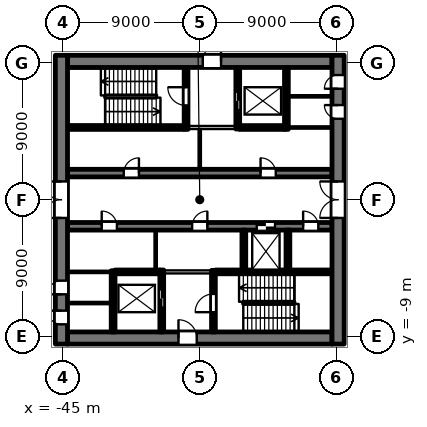
"""IFC4 building model, lengths in metres.
Left out: names, types, materials, properties, quantities, classifications, styles, units other than length and angle.
Written with IfcOpenShell. Run it as: python <this file> out.ifc"""

import sys

from ifc_helpers import new_model, si_unit, direction, frame, frame_2d, origin, place, context, subcontext, project, spatial, rectangle, extrude, element, fill, save


model = new_model("IFC4")
c1 = context("Model", 3, precision=1e-05, world=origin(), true_north=direction((0.0, 1.0)))
c2 = subcontext(c1, "Body", "Model", "MODEL_VIEW")
j1 = project(units=[si_unit("LENGTHUNIT", "METRE"), si_unit("PLANEANGLEUNIT", "RADIAN")], contexts=[c1])
p1 = place(None, origin())
s1 = spatial("IfcSite", under=j1, at=p1, CompositionType="ELEMENT")
p2 = place(p1, origin())
s2 = spatial("IfcBuilding", under=s1, at=p2, CompositionType="ELEMENT")
p3 = place(p2, frame((0.0, 0.0, -9.0)))
s3 = spatial("IfcBuildingStorey", under=s2, at=p3, CompositionType="ELEMENT", Elevation=-9.0)
p4 = place(p3, frame((-44.7, -9.1, 0.0), z_axis=(0.0, 0.0, 1.0), x_axis=(1.0, 0.0, 0.0)))
e1 = element("IfcWall", 1, at=p4, inside=s3, PredefinedType="SHEAR", context=c2, shape_type="SweptSolid", body=[
    extrude(rectangle(XDim=17.4, YDim=0.8, at=frame_2d((8.7, 0.0))), origin(), (0.0, 0.0, 1.0), 4.1),
])
p5 = place(p4, frame((7.3, 0.0, 0.0)))
e2 = element("IfcOpeningElement", 2, at=p5, cuts=e1, PredefinedType="OPENING", context=c2, shape_type="SweptSolid", body=[
    extrude(rectangle(XDim=1.2, YDim=2.1, at=frame_2d((0.6, 1.05))), frame((0.0, 0.41, 0.0), z_axis=(0.0, -1.0, 0.0), x_axis=(1.0, 0.0, 0.0)), (0.0, 0.0, 1.0), 0.82),
])
for number, where, z_axis, x_axis in (
    (3, (-44.7, -6.8, 0.0), (0.0, 0.0, 1.0), (1.0, 0.0, 0.0)),
    (4, (-44.7, -4.75, 0.0), (0.0, 0.0, 1.0), (1.0, 0.0, 0.0)),
):
    element("IfcWall", number, at=place(p3, frame(where, z_axis=z_axis, x_axis=x_axis)), inside=s3, PredefinedType="PARTITIONING", context=c2, shape_type="SweptSolid", body=[
        extrude(rectangle(XDim=2.875, YDim=0.15, at=frame_2d((1.438, 0.0))), origin(), (0.0, 0.0, 1.0), 4.1),
    ])
p6 = place(p3, frame((-41.575, -4.75, 0.0), z_axis=(0.0, 0.0, 1.0), x_axis=(1.0, 0.0, 0.0)))
e5 = element("IfcWall", 5, at=p6, inside=s3, PredefinedType="SHEAR", context=c2, shape_type="SweptSolid", body=[
    extrude(rectangle(XDim=2.95, YDim=0.25, at=frame_2d((1.475, 0.0))), origin(), (0.0, 0.0, 1.0), 4.1),
])
p7 = place(p3, frame((-38.375, -4.75, 0.0), z_axis=(0.0, 0.0, 1.0), x_axis=(1.0, 0.0, 0.0)))
e6 = element("IfcWall", 6, at=p7, inside=s3, PredefinedType="PARTITIONING", context=c2, shape_type="SweptSolid", body=[
    extrude(rectangle(XDim=3.15, YDim=0.2, at=frame_2d((1.575, 0.0))), origin(), (0.0, 0.0, 1.0), 4.1),
])
p8 = place(p3, frame((-34.975, -4.75, 0.0), z_axis=(0.0, 0.0, 1.0), x_axis=(1.0, 0.0, 0.0)))
e7 = element("IfcWall", 7, at=p8, inside=s3, PredefinedType="SHEAR", context=c2, shape_type="SweptSolid", body=[
    extrude(rectangle(XDim=7.675, YDim=0.25, at=frame_2d((3.837, 0.0))), origin(), (0.0, 0.0, 1.0), 4.1),
])
p9 = place(p3, frame((-44.7, -1.75, 0.0), z_axis=(0.0, 0.0, 1.0), x_axis=(1.0, 0.0, 0.0)))
e8 = element("IfcWall", 8, at=p9, inside=s3, PredefinedType="SHEAR", context=c2, shape_type="SweptSolid", body=[
    extrude(rectangle(XDim=17.4, YDim=0.5, at=frame_2d((8.7, 0.0))), origin(), (0.0, 0.0, 1.0), 4.1),
])
p10 = place(p9, frame((12.45, 0.0, 0.0)))
e9 = element("IfcOpeningElement", 9, at=p10, cuts=e8, PredefinedType="OPENING", context=c2, shape_type="SweptSolid", body=[
    extrude(rectangle(XDim=1.2, YDim=2.1, at=frame_2d((0.6, 1.05))), frame((0.0, 0.26, 0.0), z_axis=(0.0, -1.0, 0.0), x_axis=(1.0, 0.0, 0.0)), (0.0, 0.0, 1.0), 0.52),
])
p11 = place(p9, frame((2.25, 0.0, 0.0)))
e10 = element("IfcOpeningElement", 10, at=p11, cuts=e8, PredefinedType="OPENING", context=c2, shape_type="SweptSolid", body=[
    extrude(rectangle(XDim=1.0, YDim=2.1, at=frame_2d((0.5, 1.05))), frame((0.0, 0.26, 0.0), z_axis=(0.0, -1.0, 0.0), x_axis=(1.0, 0.0, 0.0)), (0.0, 0.0, 1.0), 0.52),
])
p12 = place(p9, frame((8.2, 0.0, 0.0)))
e11 = element("IfcOpeningElement", 11, at=p12, cuts=e8, PredefinedType="OPENING", context=c2, shape_type="SweptSolid", body=[
    extrude(rectangle(XDim=1.0, YDim=2.1, at=frame_2d((0.5, 1.05))), frame((0.0, 0.26, 0.0), z_axis=(0.0, -1.0, 0.0), x_axis=(1.0, 0.0, 0.0)), (0.0, 0.0, 1.0), 0.52),
])
p13 = place(p9, frame((15.5, 0.0, 0.0)))
e12 = element("IfcOpeningElement", 12, at=p13, cuts=e8, PredefinedType="OPENING", context=c2, shape_type="SweptSolid", body=[
    extrude(rectangle(XDim=1.0, YDim=2.1, at=frame_2d((0.5, 1.05))), frame((0.0, 0.26, 0.0), z_axis=(0.0, -1.0, 0.0), x_axis=(1.0, 0.0, 0.0)), (0.0, 0.0, 1.0), 0.52),
])
p14 = place(p3, frame((-44.7, 1.75, 0.0), z_axis=(0.0, 0.0, 1.0), x_axis=(1.0, 0.0, 0.0)))
e13 = element("IfcWall", 13, at=p14, inside=s3, PredefinedType="SHEAR", context=c2, shape_type="SweptSolid", body=[
    extrude(rectangle(XDim=17.4, YDim=0.5, at=frame_2d((8.7, 0.0))), origin(), (0.0, 0.0, 1.0), 4.1),
])
p15 = place(p14, frame((3.7, 0.0, 0.0)))
e14 = element("IfcOpeningElement", 14, at=p15, cuts=e13, PredefinedType="OPENING", context=c2, shape_type="SweptSolid", body=[
    extrude(rectangle(XDim=1.0, YDim=2.1, at=frame_2d((0.5, 1.05))), frame((0.0, 0.26, 0.0), z_axis=(0.0, -1.0, 0.0), x_axis=(1.0, 0.0, 0.0)), (0.0, 0.0, 1.0), 0.52),
])
p16 = place(p14, frame((12.7, 0.0, 0.0)))
e15 = element("IfcOpeningElement", 15, at=p16, cuts=e13, PredefinedType="OPENING", context=c2, shape_type="SweptSolid", body=[
    extrude(rectangle(XDim=1.0, YDim=2.1, at=frame_2d((0.5, 1.05))), frame((0.0, 0.26, 0.0), z_axis=(0.0, -1.0, 0.0), x_axis=(1.0, 0.0, 0.0)), (0.0, 0.0, 1.0), 0.52),
])
p17 = place(p3, frame((-44.7, 4.75, 0.0), z_axis=(0.0, 0.0, 1.0), x_axis=(1.0, 0.0, 0.0)))
e16 = element("IfcWall", 16, at=p17, inside=s3, PredefinedType="SHEAR", context=c2, shape_type="SweptSolid", body=[
    extrude(rectangle(XDim=7.675, YDim=0.25, at=frame_2d((3.837, 0.0))), origin(), (0.0, 0.0, 1.0), 4.1),
])
p18 = place(p3, frame((-36.775, 4.75, 0.0), z_axis=(0.0, 0.0, 1.0), x_axis=(1.0, 0.0, 0.0)))
e17 = element("IfcWall", 17, at=p18, inside=s3, PredefinedType="PARTITIONING", context=c2, shape_type="SweptSolid", body=[
    extrude(rectangle(XDim=3.15, YDim=0.2, at=frame_2d((1.575, 0.0))), origin(), (0.0, 0.0, 1.0), 4.1),
])
p19 = place(p3, frame((-33.375, 4.75, 0.0), z_axis=(0.0, 0.0, 1.0), x_axis=(1.0, 0.0, 0.0)))
e18 = element("IfcWall", 18, at=p19, inside=s3, PredefinedType="SHEAR", context=c2, shape_type="SweptSolid", body=[
    extrude(rectangle(XDim=2.95, YDim=0.25, at=frame_2d((1.475, 0.0))), origin(), (0.0, 0.0, 1.0), 4.1),
])
for number, where, z_axis, x_axis in (
    (19, (-30.175, 4.75, 0.0), (0.0, 0.0, 1.0), (1.0, 0.0, 0.0)),
    (20, (-30.175, 6.8, 0.0), (0.0, 0.0, 1.0), (1.0, 0.0, 0.0)),
):
    element("IfcWall", number, at=place(p3, frame(where, z_axis=z_axis, x_axis=x_axis)), inside=s3, PredefinedType="PARTITIONING", context=c2, shape_type="SweptSolid", body=[
        extrude(rectangle(XDim=2.875, YDim=0.15, at=frame_2d((1.438, 0.0))), origin(), (0.0, 0.0, 1.0), 4.1),
    ])
p20 = place(p3, frame((-44.7, 9.1, 0.0), z_axis=(0.0, 0.0, 1.0), x_axis=(1.0, 0.0, 0.0)))
e21 = element("IfcWall", 21, at=p20, inside=s3, PredefinedType="SHEAR", context=c2, shape_type="SweptSolid", body=[
    extrude(rectangle(XDim=17.4, YDim=0.8, at=frame_2d((8.7, 0.0))), origin(), (0.0, 0.0, 1.0), 4.1),
])
p21 = place(p20, frame((8.9, 0.0, 0.0)))
e22 = element("IfcOpeningElement", 22, at=p21, cuts=e21, PredefinedType="OPENING", context=c2, shape_type="SweptSolid", body=[
    extrude(rectangle(XDim=1.2, YDim=2.1, at=frame_2d((0.6, 1.05))), frame((0.0, 0.41, 0.0), z_axis=(0.0, -1.0, 0.0), x_axis=(1.0, 0.0, 0.0)), (0.0, 0.0, 1.0), 0.82),
])
p22 = place(p3, frame((-45.1, -9.5, 0.0), z_axis=(0.0, 0.0, 1.0), x_axis=(0.0, 1.0, 0.0)))
e23 = element("IfcWall", 23, at=p22, inside=s3, PredefinedType="SHEAR", context=c2, shape_type="SweptSolid", body=[
    extrude(rectangle(XDim=19.0, YDim=0.8, at=frame_2d((9.5, 0.0))), origin(), (0.0, 0.0, 1.0), 4.1),
])
p23 = place(p22, frame((8.3, 0.0, 0.0)))
e24 = element("IfcOpeningElement", 24, at=p23, cuts=e23, PredefinedType="OPENING", context=c2, shape_type="SweptSolid", body=[
    extrude(rectangle(XDim=2.4, YDim=2.1, at=frame_2d((1.2, 1.05))), frame((0.0, 0.41, 0.0), z_axis=(0.0, -1.0, 0.0), x_axis=(1.0, 0.0, 0.0)), (0.0, 0.0, 1.0), 0.82),
])
p24 = place(p22, frame((1.3, 0.0, 0.0)))
e25 = element("IfcOpeningElement", 25, at=p24, cuts=e23, PredefinedType="OPENING", context=c2, shape_type="SweptSolid", body=[
    extrude(rectangle(XDim=0.9, YDim=2.1, at=frame_2d((0.45, 1.05))), frame((0.0, 0.41, 0.0), z_axis=(0.0, -1.0, 0.0), x_axis=(1.0, 0.0, 0.0)), (0.0, 0.0, 1.0), 0.82),
])
p25 = place(p22, frame((3.275, 0.0, 0.0)))
e26 = element("IfcOpeningElement", 26, at=p25, cuts=e23, PredefinedType="OPENING", context=c2, shape_type="SweptSolid", body=[
    extrude(rectangle(XDim=0.9, YDim=2.1, at=frame_2d((0.45, 1.05))), frame((0.0, 0.41, 0.0), z_axis=(0.0, -1.0, 0.0), x_axis=(1.0, 0.0, 0.0)), (0.0, 0.0, 1.0), 0.82),
])
p26 = place(p3, frame((-41.7, -8.7, 0.0), z_axis=(0.0, 0.0, 1.0), x_axis=(0.0, 1.0, 0.0)))
e27 = element("IfcWall", 27, at=p26, inside=s3, PredefinedType="SHEAR", context=c2, shape_type="SweptSolid", body=[
    extrude(rectangle(XDim=4.025, YDim=0.25, at=frame_2d((2.012, 0.0))), origin(), (0.0, 0.0, 1.0), 4.1),
])
p27 = place(p3, frame((-38.9, -4.625, 0.0), z_axis=(0.0, 0.0, 1.0), x_axis=(0.0, 1.0, 0.0)))
e28 = element("IfcWall", 28, at=p27, inside=s3, PredefinedType="PARTITIONING", context=c2, shape_type="SweptSolid", body=[
    extrude(rectangle(XDim=2.625, YDim=0.15, at=frame_2d((1.312, 0.0))), origin(), (0.0, 0.0, 1.0), 4.1),
])
p28 = place(p3, frame((-38.5, -8.7, 0.0), z_axis=(0.0, 0.0, 1.0), x_axis=(0.0, 1.0, 0.0)))
e29 = element("IfcWall", 29, at=p28, inside=s3, PredefinedType="SHEAR", context=c2, shape_type="SweptSolid", body=[
    extrude(rectangle(XDim=4.075, YDim=0.25, at=frame_2d((2.038, 0.0))), origin(), (0.0, 0.0, 1.0), 4.1),
])
p29 = place(p28, frame((1.6, 0.0, 0.0)))
e30 = element("IfcOpeningElement", 30, at=p29, cuts=e29, PredefinedType="OPENING", context=c2, shape_type="SweptSolid", body=[
    extrude(rectangle(XDim=1.2, YDim=2.1, at=frame_2d((0.6, 1.05))), frame((0.0, 0.135, 0.0), z_axis=(0.0, -1.0, 0.0), x_axis=(1.0, 0.0, 0.0)), (0.0, 0.0, 1.0), 0.27),
])
p30 = place(p3, frame((-36.9, 4.625, 0.0), z_axis=(0.0, 0.0, 1.0), x_axis=(0.0, 1.0, 0.0)))
e31 = element("IfcWall", 31, at=p30, inside=s3, PredefinedType="SHEAR", context=c2, shape_type="SweptSolid", body=[
    extrude(rectangle(XDim=4.075, YDim=0.25, at=frame_2d((2.038, 0.0))), origin(), (0.0, 0.0, 1.0), 4.1),
])
p31 = place(p30, frame((1.575, 0.0, 0.0)))
e32 = element("IfcOpeningElement", 32, at=p31, cuts=e31, PredefinedType="OPENING", context=c2, shape_type="SweptSolid", body=[
    extrude(rectangle(XDim=1.2, YDim=2.1, at=frame_2d((0.6, 1.05))), frame((0.0, 0.135, 0.0), z_axis=(0.0, -1.0, 0.0), x_axis=(1.0, 0.0, 0.0)), (0.0, 0.0, 1.0), 0.27),
])
p32 = place(p3, frame((-36.0, 2.0, 0.0), z_axis=(0.0, 0.0, 1.0), x_axis=(0.0, 1.0, 0.0)))
e33 = element("IfcWall", 33, at=p32, inside=s3, PredefinedType="PARTITIONING", context=c2, shape_type="SweptSolid", body=[
    extrude(rectangle(XDim=2.65, YDim=0.15, at=frame_2d((1.325, 0.0))), origin(), (0.0, 0.0, 1.0), 4.1),
])
p33 = place(p3, frame((-35.1, -8.7, 0.0), z_axis=(0.0, 0.0, 1.0), x_axis=(0.0, 1.0, 0.0)))
e34 = element("IfcWall", 34, at=p33, inside=s3, PredefinedType="SHEAR", context=c2, shape_type="SweptSolid", body=[
    extrude(rectangle(XDim=4.05, YDim=0.25, at=frame_2d((2.025, 0.0))), origin(), (0.0, 0.0, 1.0), 4.1),
])
p34 = place(p33, frame((1.3, 0.0, 0.0)))
e35 = element("IfcOpeningElement", 35, at=p34, cuts=e34, PredefinedType="OPENING", context=c2, shape_type="SweptSolid", body=[
    extrude(rectangle(XDim=1.2, YDim=2.1, at=frame_2d((0.6, 1.05))), frame((0.0, 0.135, 0.0), z_axis=(0.0, -1.0, 0.0), x_axis=(1.0, 0.0, 0.0)), (0.0, 0.0, 1.0), 0.27),
])
p35 = place(p3, frame((-33.5, 4.65, 0.0), z_axis=(0.0, 0.0, 1.0), x_axis=(0.0, 1.0, 0.0)))
e36 = element("IfcWall", 36, at=p35, inside=s3, PredefinedType="SHEAR", context=c2, shape_type="SweptSolid", body=[
    extrude(rectangle(XDim=4.05, YDim=0.25, at=frame_2d((2.025, 0.0))), origin(), (0.0, 0.0, 1.0), 4.1),
])
p36 = place(p35, frame((1.25, 0.0, 0.0)))
e37 = element("IfcOpeningElement", 37, at=p36, cuts=e36, PredefinedType="OPENING", context=c2, shape_type="SweptSolid", body=[
    extrude(rectangle(XDim=1.2, YDim=2.1, at=frame_2d((0.6, 1.05))), frame((0.0, 0.135, 0.0), z_axis=(0.0, -1.0, 0.0), x_axis=(1.0, 0.0, 0.0)), (0.0, 0.0, 1.0), 0.27),
])
p37 = place(p3, frame((-33.1, -4.625, 0.0), z_axis=(0.0, 0.0, 1.0), x_axis=(0.0, 1.0, 0.0)))
e38 = element("IfcWall", 38, at=p37, inside=s3, PredefinedType="SHEAR", context=c2, shape_type="SweptSolid", body=[
    extrude(rectangle(XDim=2.625, YDim=0.25, at=frame_2d((1.312, 0.0))), origin(), (0.0, 0.0, 1.0), 4.1),
])
p38 = place(p3, frame((-30.3, 4.625, 0.0), z_axis=(0.0, 0.0, 1.0), x_axis=(0.0, 1.0, 0.0)))
e39 = element("IfcWall", 39, at=p38, inside=s3, PredefinedType="SHEAR", context=c2, shape_type="SweptSolid", body=[
    extrude(rectangle(XDim=4.075, YDim=0.25, at=frame_2d((2.038, 0.0))), origin(), (0.0, 0.0, 1.0), 4.1),
])
p39 = place(p3, frame((-30.2, -4.625, 0.0), z_axis=(0.0, 0.0, 1.0), x_axis=(0.0, 1.0, 0.0)))
e40 = element("IfcWall", 40, at=p39, inside=s3, PredefinedType="SHEAR", context=c2, shape_type="SweptSolid", body=[
    extrude(rectangle(XDim=2.625, YDim=0.25, at=frame_2d((1.312, 0.0))), origin(), (0.0, 0.0, 1.0), 4.1),
])
p40 = place(p3, frame((-26.9, -9.5, 0.0), z_axis=(0.0, 0.0, 1.0), x_axis=(0.0, 1.0, 0.0)))
e41 = element("IfcWall", 41, at=p40, inside=s3, PredefinedType="SHEAR", context=c2, shape_type="SweptSolid", body=[
    extrude(rectangle(XDim=19.0, YDim=0.8, at=frame_2d((9.5, 0.0))), origin(), (0.0, 0.0, 1.0), 4.1),
])
p41 = place(p40, frame((8.3, 0.0, 0.0)))
e42 = element("IfcOpeningElement", 42, at=p41, cuts=e41, PredefinedType="OPENING", context=c2, shape_type="SweptSolid", body=[
    extrude(rectangle(XDim=2.4, YDim=2.1, at=frame_2d((1.2, 1.05))), frame((0.0, 0.41, 0.0), z_axis=(0.0, -1.0, 0.0), x_axis=(1.0, 0.0, 0.0)), (0.0, 0.0, 1.0), 0.82),
])
p42 = place(p40, frame((14.825, 0.0, 0.0)))
e43 = element("IfcOpeningElement", 43, at=p42, cuts=e41, PredefinedType="OPENING", context=c2, shape_type="SweptSolid", body=[
    extrude(rectangle(XDim=0.9, YDim=2.1, at=frame_2d((0.45, 1.05))), frame((0.0, 0.41, 0.0), z_axis=(0.0, -1.0, 0.0), x_axis=(1.0, 0.0, 0.0)), (0.0, 0.0, 1.0), 0.82),
])
p43 = place(p40, frame((16.8, 0.0, 0.0)))
e44 = element("IfcOpeningElement", 44, at=p43, cuts=e41, PredefinedType="OPENING", context=c2, shape_type="SweptSolid", body=[
    extrude(rectangle(XDim=0.9, YDim=2.1, at=frame_2d((0.45, 1.05))), frame((0.0, 0.41, 0.0), z_axis=(0.0, -1.0, 0.0), x_axis=(1.0, 0.0, 0.0)), (0.0, 0.0, 1.0), 0.82),
])
p44 = place(p23, origin())
e45 = element("IfcDoor", 45, at=p44, inside=s3, OperationType="DOUBLE_DOOR_SINGLE_SWING", PredefinedType="DOOR", context=c2, shape_type="SweptSolid", body=[
    extrude(rectangle(XDim=2.4, YDim=2.1, at=frame_2d((1.2, 1.05))), frame((0.0, -0.225, 0.0), z_axis=(0.0, -1.0, 0.0), x_axis=(1.0, 0.0, 0.0)), (0.0, 0.0, 1.0), 0.05),
])
fill(e24, e45)
p45 = place(p41, origin())
e46 = element("IfcDoor", 46, at=p45, inside=s3, OperationType="DOUBLE_DOOR_SINGLE_SWING", PredefinedType="DOOR", context=c2, shape_type="SweptSolid", body=[
    extrude(rectangle(XDim=2.4, YDim=2.1, at=frame_2d((1.2, 1.05))), frame((0.0, 0.275, 0.0), z_axis=(0.0, -1.0, 0.0), x_axis=(1.0, 0.0, 0.0)), (0.0, 0.0, 1.0), 0.05),
])
fill(e42, e46)
p46 = place(p15, origin())
e47 = element("IfcDoor", 47, at=p46, inside=s3, OperationType="SINGLE_SWING_RIGHT", PredefinedType="DOOR", context=c2, shape_type="SweptSolid", body=[
    extrude(rectangle(XDim=1.0, YDim=2.1, at=frame_2d((0.5, 1.05))), frame((0.0, 0.025, 0.0), z_axis=(0.0, -1.0, 0.0), x_axis=(1.0, 0.0, 0.0)), (0.0, 0.0, 1.0), 0.05),
])
fill(e14, e47)
p47 = place(p16, origin())
e48 = element("IfcDoor", 48, at=p47, inside=s3, OperationType="SINGLE_SWING_LEFT", PredefinedType="DOOR", context=c2, shape_type="SweptSolid", body=[
    extrude(rectangle(XDim=1.0, YDim=2.1, at=frame_2d((0.5, 1.05))), frame((0.0, 0.025, 0.0), z_axis=(0.0, -1.0, 0.0), x_axis=(1.0, 0.0, 0.0)), (0.0, 0.0, 1.0), 0.05),
])
fill(e15, e48)
p48 = place(p10, origin())
e49 = element("IfcDoor", 49, at=p48, inside=s3, OperationType="SLIDING_TO_LEFT", PredefinedType="DOOR", context=c2, shape_type="SweptSolid", body=[
    extrude(rectangle(XDim=1.2, YDim=2.1, at=frame_2d((0.6, 1.05))), frame((0.0, 0.025, 0.0), z_axis=(0.0, -1.0, 0.0), x_axis=(1.0, 0.0, 0.0)), (0.0, 0.0, 1.0), 0.05),
])
fill(e9, e49)
p49 = place(p36, origin())
e50 = element("IfcDoor", 50, at=p49, inside=s3, OperationType="SLIDING_TO_LEFT", PredefinedType="DOOR", context=c2, shape_type="SweptSolid", body=[
    extrude(rectangle(XDim=1.2, YDim=2.1, at=frame_2d((0.6, 1.05))), frame((0.0, 0.025, 0.0), z_axis=(0.0, -1.0, 0.0), x_axis=(1.0, 0.0, 0.0)), (0.0, 0.0, 1.0), 0.05),
])
fill(e37, e50)
p50 = place(p29, origin())
e51 = element("IfcDoor", 51, at=p50, inside=s3, OperationType="SLIDING_TO_LEFT", PredefinedType="DOOR", context=c2, shape_type="SweptSolid", body=[
    extrude(rectangle(XDim=1.2, YDim=2.1, at=frame_2d((0.6, 1.05))), frame((0.0, 0.025, 0.0), z_axis=(0.0, -1.0, 0.0), x_axis=(1.0, 0.0, 0.0)), (0.0, 0.0, 1.0), 0.05),
])
fill(e30, e51)
p51 = place(p11, origin())
e52 = element("IfcDoor", 52, at=p51, inside=s3, OperationType="SINGLE_SWING_LEFT", PredefinedType="DOOR", context=c2, shape_type="SweptSolid", body=[
    extrude(rectangle(XDim=1.0, YDim=2.1, at=frame_2d((0.5, 1.05))), frame((0.0, 0.025, 0.0), z_axis=(0.0, -1.0, 0.0), x_axis=(1.0, 0.0, 0.0)), (0.0, 0.0, 1.0), 0.05),
])
fill(e10, e52)
p52 = place(p12, origin())
e53 = element("IfcDoor", 53, at=p52, inside=s3, OperationType="SINGLE_SWING_RIGHT", PredefinedType="DOOR", context=c2, shape_type="SweptSolid", body=[
    extrude(rectangle(XDim=1.0, YDim=2.1, at=frame_2d((0.5, 1.05))), frame((0.0, 0.025, 0.0), z_axis=(0.0, -1.0, 0.0), x_axis=(1.0, 0.0, 0.0)), (0.0, 0.0, 1.0), 0.05),
])
fill(e11, e53)
p53 = place(p13, origin())
e54 = element("IfcDoor", 54, at=p53, inside=s3, OperationType="SINGLE_SWING_LEFT", PredefinedType="DOOR", context=c2, shape_type="SweptSolid", body=[
    extrude(rectangle(XDim=1.0, YDim=2.1, at=frame_2d((0.5, 1.05))), frame((0.0, 0.025, 0.0), z_axis=(0.0, -1.0, 0.0), x_axis=(1.0, 0.0, 0.0)), (0.0, 0.0, 1.0), 0.05),
])
fill(e12, e54)
p54 = place(p31, origin())
e55 = element("IfcDoor", 55, at=p54, inside=s3, OperationType="SINGLE_SWING_RIGHT", PredefinedType="DOOR", context=c2, shape_type="SweptSolid", body=[
    extrude(rectangle(XDim=1.2, YDim=2.1, at=frame_2d((0.6, 1.05))), frame((0.0, 0.025, 0.0), z_axis=(0.0, -1.0, 0.0), x_axis=(1.0, 0.0, 0.0)), (0.0, 0.0, 1.0), 0.05),
])
fill(e32, e55)
p55 = place(p34, origin())
e56 = element("IfcDoor", 56, at=p55, inside=s3, OperationType="SINGLE_SWING_LEFT", PredefinedType="DOOR", context=c2, shape_type="SweptSolid", body=[
    extrude(rectangle(XDim=1.2, YDim=2.1, at=frame_2d((0.6, 1.05))), frame((0.0, 0.025, 0.0), z_axis=(0.0, -1.0, 0.0), x_axis=(1.0, 0.0, 0.0)), (0.0, 0.0, 1.0), 0.05),
])
fill(e35, e56)
p56 = place(p21, origin())
e57 = element("IfcDoor", 57, at=p56, inside=s3, OperationType="SINGLE_SWING_RIGHT", PredefinedType="DOOR", context=c2, shape_type="SweptSolid", body=[
    extrude(rectangle(XDim=1.2, YDim=2.1, at=frame_2d((0.6, 1.05))), frame((0.0, -0.225, 0.0), z_axis=(0.0, -1.0, 0.0), x_axis=(1.0, 0.0, 0.0)), (0.0, 0.0, 1.0), 0.05),
])
fill(e22, e57)
p57 = place(p5, origin())
e58 = element("IfcDoor", 58, at=p57, inside=s3, OperationType="SINGLE_SWING_LEFT", PredefinedType="DOOR", context=c2, shape_type="SweptSolid", body=[
    extrude(rectangle(XDim=1.2, YDim=2.1, at=frame_2d((0.6, 1.05))), frame((0.0, 0.275, 0.0), z_axis=(0.0, -1.0, 0.0), x_axis=(1.0, 0.0, 0.0)), (0.0, 0.0, 1.0), 0.05),
])
fill(e2, e58)
p58 = place(p42, origin())
e59 = element("IfcDoor", 59, at=p58, inside=s3, OperationType="SINGLE_SWING_RIGHT", PredefinedType="DOOR", context=c2, shape_type="SweptSolid", body=[
    extrude(rectangle(XDim=0.9, YDim=2.1, at=frame_2d((0.45, 1.05))), frame((0.0, 0.275, 0.0), z_axis=(0.0, -1.0, 0.0), x_axis=(1.0, 0.0, 0.0)), (0.0, 0.0, 1.0), 0.05),
])
fill(e43, e59)
p59 = place(p43, origin())
e60 = element("IfcDoor", 60, at=p59, inside=s3, OperationType="SINGLE_SWING_LEFT", PredefinedType="DOOR", context=c2, shape_type="SweptSolid", body=[
    extrude(rectangle(XDim=0.9, YDim=2.1, at=frame_2d((0.45, 1.05))), frame((0.0, 0.275, 0.0), z_axis=(0.0, -1.0, 0.0), x_axis=(1.0, 0.0, 0.0)), (0.0, 0.0, 1.0), 0.05),
])
fill(e44, e60)
p60 = place(p24, origin())
e61 = element("IfcDoor", 61, at=p60, inside=s3, OperationType="SINGLE_SWING_RIGHT", PredefinedType="DOOR", context=c2, shape_type="SweptSolid", body=[
    extrude(rectangle(XDim=0.9, YDim=2.1, at=frame_2d((0.45, 1.05))), frame((0.0, -0.225, 0.0), z_axis=(0.0, -1.0, 0.0), x_axis=(1.0, 0.0, 0.0)), (0.0, 0.0, 1.0), 0.05),
])
fill(e25, e61)
p61 = place(p25, origin())
e62 = element("IfcDoor", 62, at=p61, inside=s3, OperationType="SINGLE_SWING_LEFT", PredefinedType="DOOR", context=c2, shape_type="SweptSolid", body=[
    extrude(rectangle(XDim=0.9, YDim=2.1, at=frame_2d((0.45, 1.05))), frame((0.0, -0.225, 0.0), z_axis=(0.0, -1.0, 0.0), x_axis=(1.0, 0.0, 0.0)), (0.0, 0.0, 1.0), 0.05),
])
fill(e26, e62)
save(model, sys.argv[1])
